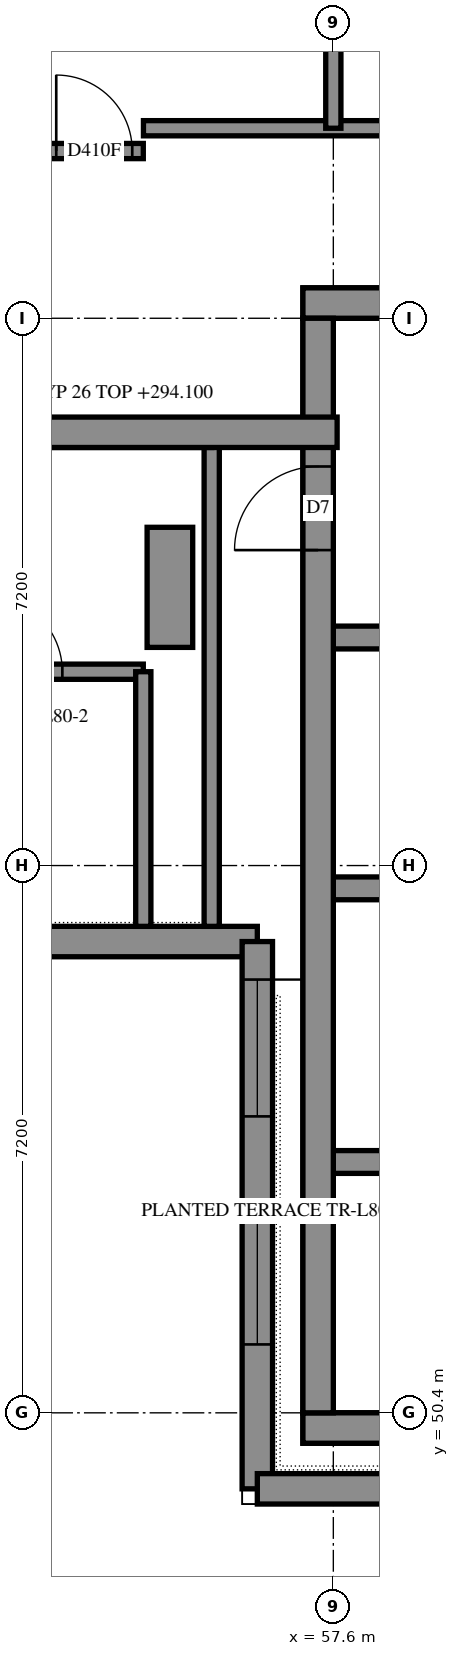
"""IFC4 building model, lengths in metres.
Left out: names, types, materials, properties, quantities, classifications, styles, units other than length and angle.
Written with IfcOpenShell. Run it as: python <this file> out.ifc"""

import sys

from ifc_helpers import new_model, si_unit, direction, frame, frame_2d, origin, place, context, subcontext, project, spatial, polyline, rectangle, outline, extrude, element, fill, save


model = new_model("IFC4")
c1 = context("Model", 3, precision=1e-05, world=origin(), true_north=direction((0.0, 1.0)))
c2 = subcontext(c1, "Body", "Model", "MODEL_VIEW")
j1 = project(units=[si_unit("LENGTHUNIT", "METRE"), si_unit("PLANEANGLEUNIT", "RADIAN")], contexts=[c1])
p1 = place(None, origin())
s1 = spatial("IfcSite", under=j1, at=p1, CompositionType="ELEMENT")
p2 = place(p1, origin())
s2 = spatial("IfcBuilding", under=s1, at=p2, CompositionType="ELEMENT")
p3 = place(p2, frame((0.0, 0.0, 294.4)))
s3 = spatial("IfcBuildingStorey", under=s2, at=p3, CompositionType="ELEMENT", Elevation=294.4)
p4 = place(p3, frame((57.2, 50.2, -0.3), z_axis=(0.0, 0.0, 1.0), x_axis=(1.0, 0.0, 0.0)))
e1 = element("IfcWall", 1, at=p4, inside=s3, PredefinedType="SHEAR", context=c2, shape_type="SweptSolid", body=[
    extrude(outline(polyline([(0.0, 0.0), (15.2, 0.0), (15.2, 3.1), (0.0, 3.1), (0.0, 0.0)])), frame((0.0, 0.2, 0.0), z_axis=(0.0, -1.0, 0.0), x_axis=(1.0, 0.0, 0.0)), (0.0, 0.0, 1.0), 0.4),
])
p5 = place(p3, frame((57.2, 65.0, -0.3), z_axis=(0.0, 0.0, 1.0), x_axis=(1.0, 0.0, 0.0)))
e2 = element("IfcWall", 2, at=p5, inside=s3, PredefinedType="SHEAR", context=c2, shape_type="SweptSolid", body=[
    extrude(outline(polyline([(0.0, 0.0), (15.2, 0.0), (15.2, 3.1), (0.0, 3.1), (0.0, 0.0)])), frame((0.0, 0.2, 0.0), z_axis=(0.0, -1.0, 0.0), x_axis=(1.0, 0.0, 0.0)), (0.0, 0.0, 1.0), 0.4),
])
p6 = place(p5, frame((10.4, 0.0, 0.3)))
e3 = element("IfcOpeningElement", 3, at=p6, cuts=e2, PredefinedType="OPENING", context=c2, shape_type="SweptSolid", body=[
    extrude(rectangle(XDim=0.8, YDim=2.1, at=frame_2d((0.4, 1.05))), frame((0.0, 0.21, 0.0), z_axis=(0.0, -1.0, 0.0), x_axis=(1.0, 0.0, 0.0)), (0.0, 0.0, 1.0), 0.42),
])
p7 = place(p3, frame((57.4, 50.4, -0.3), z_axis=(0.0, 0.0, 1.0), x_axis=(0.0, 1.0, 0.0)))
e4 = element("IfcWall", 4, at=p7, inside=s3, PredefinedType="SHEAR", context=c2, shape_type="SweptSolid", body=[
    extrude(outline(polyline([(0.0, 0.0), (14.4, 0.0), (14.4, 3.1), (0.0, 3.1), (0.0, 0.0)])), frame((0.0, 0.2, 0.0), z_axis=(0.0, -1.0, 0.0), x_axis=(1.0, 0.0, 0.0)), (0.0, 0.0, 1.0), 0.4),
])
p8 = place(p7, frame((11.35, 0.0, 0.3)))
e5 = element("IfcOpeningElement", 5, at=p8, cuts=e4, PredefinedType="OPENING", context=c2, shape_type="SweptSolid", body=[
    extrude(rectangle(XDim=1.1, YDim=2.1, at=frame_2d((0.55, 1.05))), frame((0.0, 0.21, 0.0), z_axis=(0.0, -1.0, 0.0), x_axis=(1.0, 0.0, 0.0)), (0.0, 0.0, 1.0), 0.42),
])
p9 = place(p3, frame((57.6, 53.7, 0.0), z_axis=(0.0, 0.0, 1.0), x_axis=(1.0, 0.0, 0.0)))
e6 = element("IfcWall", 6, at=p9, inside=s3, PredefinedType="SOLIDWALL", context=c2, shape_type="SweptSolid", body=[
    extrude(outline(polyline([(0.0, 0.0), (14.4, 0.0), (14.4, 3.5), (0.0, 3.5), (0.0, 0.0)])), frame((0.0, 0.15, 0.0), z_axis=(0.0, -1.0, 0.0), x_axis=(1.0, 0.0, 0.0)), (0.0, 0.0, 1.0), 0.3),
])
p10 = place(p9, frame((12.05, 0.0, 0.0)))
e7 = element("IfcOpeningElement", 7, at=p10, cuts=e6, PredefinedType="OPENING", context=c2, shape_type="SweptSolid", body=[
    extrude(rectangle(XDim=1.1, YDim=2.1, at=frame_2d((0.55, 1.05))), frame((0.0, 0.16, 0.0), z_axis=(0.0, -1.0, 0.0), x_axis=(1.0, 0.0, 0.0)), (0.0, 0.0, 1.0), 0.32),
])
p11 = place(p3, frame((57.6, 57.3, 0.0), z_axis=(0.0, 0.0, 1.0), x_axis=(1.0, 0.0, 0.0)))
e8 = element("IfcWall", 8, at=p11, inside=s3, PredefinedType="SOLIDWALL", context=c2, shape_type="SweptSolid", body=[
    extrude(outline(polyline([(0.0, 0.0), (14.4, 0.0), (14.4, 3.5), (0.0, 3.5), (0.0, 0.0)])), frame((0.0, 0.15, 0.0), z_axis=(0.0, -1.0, 0.0), x_axis=(1.0, 0.0, 0.0)), (0.0, 0.0, 1.0), 0.3),
])
p12 = place(p11, frame((12.05, 0.0, 0.0)))
e9 = element("IfcOpeningElement", 9, at=p12, cuts=e8, PredefinedType="OPENING", context=c2, shape_type="SweptSolid", body=[
    extrude(rectangle(XDim=1.1, YDim=2.1, at=frame_2d((0.55, 1.05))), frame((0.0, 0.16, 0.0), z_axis=(0.0, -1.0, 0.0), x_axis=(1.0, 0.0, 0.0)), (0.0, 0.0, 1.0), 0.32),
])
p13 = place(p3, frame((57.6, 60.6, 0.0), z_axis=(0.0, 0.0, 1.0), x_axis=(1.0, 0.0, 0.0)))
e10 = element("IfcWall", 10, at=p13, inside=s3, PredefinedType="SOLIDWALL", context=c2, shape_type="SweptSolid", body=[
    extrude(outline(polyline([(0.0, 0.0), (7.2, 0.0), (7.2, 3.5), (0.0, 3.5), (0.0, 0.0)])), frame((0.0, 0.15, 0.0), z_axis=(0.0, -1.0, 0.0), x_axis=(1.0, 0.0, 0.0)), (0.0, 0.0, 1.0), 0.3),
])
p14 = place(p3, frame((49.4, 56.6, 0.0), z_axis=(0.0, 0.0, 1.0), x_axis=(1.0, 0.0, 0.0)))
e11 = element("IfcWall", 11, at=p14, inside=s3, PredefinedType="SOLIDWALL", context=c2, shape_type="SweptSolid", body=[
    extrude(outline(polyline([(-0.2, -0.2), (7.0, -0.2), (7.0, 0.2), (0.2, 0.2), (-0.2, -0.2)])), origin(), (0.0, 0.0, 1.0), 3.5),
])
p15 = place(p14, frame((1.9, 0.0, 0.7)))
e12 = element("IfcOpeningElement", 12, at=p15, cuts=e11, PredefinedType="OPENING", context=c2, shape_type="SweptSolid", body=[
    extrude(rectangle(XDim=1.8, YDim=2.2, at=frame_2d((0.9, 1.1))), frame((0.0, 0.21, 0.0), z_axis=(0.0, -1.0, 0.0), x_axis=(1.0, 0.0, 0.0)), (0.0, 0.0, 1.0), 0.42),
])
p16 = place(p3, frame((56.6, 56.6, 0.0), z_axis=(0.0, 0.0, 1.0), x_axis=(0.0, -1.0, 0.0)))
e13 = element("IfcWall", 13, at=p16, inside=s3, PredefinedType="SOLIDWALL", context=c2, shape_type="SweptSolid", body=[
    extrude(outline(polyline([(-0.2, -0.2), (7.4, -0.2), (7.0, 0.2), (-0.2, 0.2), (-0.2, -0.2)])), origin(), (0.0, 0.0, 1.0), 3.5),
])
p17 = place(p16, frame((0.5, 0.0, 0.7)))
e14 = element("IfcOpeningElement", 14, at=p17, cuts=e13, PredefinedType="OPENING", context=c2, shape_type="SweptSolid", body=[
    extrude(rectangle(XDim=1.8, YDim=2.2, at=frame_2d((0.9, 1.1))), frame((0.0, 0.21, 0.0), z_axis=(0.0, -1.0, 0.0), x_axis=(1.0, 0.0, 0.0)), (0.0, 0.0, 1.0), 0.42),
])
p18 = place(p16, frame((3.5, 0.0, 0.7)))
e15 = element("IfcOpeningElement", 15, at=p18, cuts=e13, PredefinedType="OPENING", context=c2, shape_type="SweptSolid", body=[
    extrude(rectangle(XDim=1.8, YDim=2.2, at=frame_2d((0.9, 1.1))), frame((0.0, 0.21, 0.0), z_axis=(0.0, -1.0, 0.0), x_axis=(1.0, 0.0, 0.0)), (0.0, 0.0, 1.0), 0.42),
])
p19 = place(p3, frame((56.6, 49.4, 0.0), z_axis=(0.0, 0.0, 1.0), x_axis=(1.0, 0.0, 0.0)))
e16 = element("IfcWall", 16, at=p19, inside=s3, PredefinedType="SOLIDWALL", context=c2, shape_type="SweptSolid", body=[
    extrude(outline(polyline([(-0.2, -0.2), (13.156, -0.2), (13.322, 0.2), (0.2, 0.2), (-0.2, -0.2)])), origin(), (0.0, 0.0, 1.0), 3.5),
])
p20 = place(p19, frame((1.9, 0.0, 0.7)))
e17 = element("IfcOpeningElement", 17, at=p20, cuts=e16, PredefinedType="OPENING", context=c2, shape_type="SweptSolid", body=[
    extrude(rectangle(XDim=1.8, YDim=2.2, at=frame_2d((0.9, 1.1))), frame((0.0, 0.21, 0.0), z_axis=(0.0, -1.0, 0.0), x_axis=(1.0, 0.0, 0.0)), (0.0, 0.0, 1.0), 0.42),
])
p21 = place(p19, frame((5.5, 0.0, 0.7)))
e18 = element("IfcOpeningElement", 18, at=p21, cuts=e16, PredefinedType="OPENING", context=c2, shape_type="SweptSolid", body=[
    extrude(rectangle(XDim=1.8, YDim=2.2, at=frame_2d((0.9, 1.1))), frame((0.0, 0.21, 0.0), z_axis=(0.0, -1.0, 0.0), x_axis=(1.0, 0.0, 0.0)), (0.0, 0.0, 1.0), 0.42),
])
p22 = place(p19, frame((9.1, 0.0, 0.7)))
e19 = element("IfcOpeningElement", 19, at=p22, cuts=e16, PredefinedType="OPENING", context=c2, shape_type="SweptSolid", body=[
    extrude(rectangle(XDim=1.8, YDim=2.2, at=frame_2d((0.9, 1.1))), frame((0.0, 0.21, 0.0), z_axis=(0.0, -1.0, 0.0), x_axis=(1.0, 0.0, 0.0)), (0.0, 0.0, 1.0), 0.42),
])
p23 = place(p3, frame((56.0, 56.8, 0.0), z_axis=(0.0, 0.0, 1.0), x_axis=(0.0, 1.0, 0.0)))
e20 = element("IfcWall", 20, at=p23, inside=s3, PredefinedType="PARAPET", context=c2, shape_type="SweptSolid", body=[
    extrude(outline(polyline([(0.0, -0.1), (6.5, -0.1), (6.3, 0.1), (0.0, 0.1), (0.0, -0.1)])), origin(), (0.0, 0.0, 1.0), 0.25),
])
p24 = place(p3, frame((56.0, 63.2, 0.0), z_axis=(0.0, 0.0, 1.0), x_axis=(-1.0, 0.0, 0.0)))
e21 = element("IfcWall", 21, at=p24, inside=s3, PredefinedType="PARAPET", context=c2, shape_type="SweptSolid", body=[
    extrude(outline(polyline([(-0.1, -0.1), (6.4, -0.1), (6.4, 0.1), (0.1, 0.1), (-0.1, -0.1)])), origin(), (0.0, 0.0, 1.0), 0.25),
])
p25 = place(p3, frame((55.45, 60.47, 0.0), z_axis=(0.0, 0.0, 1.0), x_axis=(0.0, 1.0, 0.0)))
e22 = element("IfcWall", 22, at=p25, inside=s3, PredefinedType="SOLIDWALL", context=c2, shape_type="SweptSolid", body=[
    extrude(rectangle(XDim=1.58, YDim=0.6, at=frame_2d((0.79, 0.0))), origin(), (0.0, 0.0, 1.0), 0.65),
])
p26 = place(p3, frame((55.102, 67.3, 0.0), z_axis=(0.0, 0.0, 1.0), x_axis=(1.0, 0.0, 0.0)))
e23 = element("IfcWall", 23, at=p26, inside=s3, PredefinedType="PARTITIONING", context=c2, shape_type="SweptSolid", body=[
    extrude(rectangle(XDim=19.398, YDim=0.2, at=frame_2d((9.699, 0.0))), origin(), (0.0, 0.0, 1.0), 3.5),
])
p27 = place(p26, frame((6.361, 0.0, 0.0)))
e24 = element("IfcOpeningElement", 24, at=p27, cuts=e23, PredefinedType="OPENING", context=c2, shape_type="SweptSolid", body=[
    extrude(rectangle(XDim=1.0, YDim=2.1, at=frame_2d((0.5, 1.05))), frame((0.0, 0.11, 0.0), z_axis=(0.0, -1.0, 0.0), x_axis=(1.0, 0.0, 0.0)), (0.0, 0.0, 1.0), 0.22),
])
p28 = place(p26, frame((13.56, 0.0, 0.0)))
e25 = element("IfcOpeningElement", 25, at=p28, cuts=e23, PredefinedType="OPENING", context=c2, shape_type="SweptSolid", body=[
    extrude(rectangle(XDim=1.0, YDim=2.1, at=frame_2d((0.5, 1.05))), frame((0.0, 0.11, 0.0), z_axis=(0.0, -1.0, 0.0), x_axis=(1.0, 0.0, 0.0)), (0.0, 0.0, 1.0), 0.22),
])
p29 = place(p3, frame((43.2, 67.0, 0.0), z_axis=(0.0, 0.0, 1.0), x_axis=(1.0, 0.0, 0.0)))
e26 = element("IfcWall", 26, at=p29, inside=s3, PredefinedType="PARTITIONING", context=c2, shape_type="SweptSolid", body=[
    extrude(rectangle(XDim=11.9, YDim=0.2, at=frame_2d((5.95, 0.0))), origin(), (0.0, 0.0, 1.0), 3.5),
])
p30 = place(p29, frame((3.862, 0.0, 0.0)))
e27 = element("IfcOpeningElement", 27, at=p30, cuts=e26, PredefinedType="OPENING", context=c2, shape_type="SweptSolid", body=[
    extrude(rectangle(XDim=1.0, YDim=2.1, at=frame_2d((0.5, 1.05))), frame((0.0, 0.11, 0.0), z_axis=(0.0, -1.0, 0.0), x_axis=(1.0, 0.0, 0.0)), (0.0, 0.0, 1.0), 0.22),
])
p31 = place(p29, frame((10.755, 0.0, 0.0)))
e28 = element("IfcOpeningElement", 28, at=p31, cuts=e26, PredefinedType="OPENING", context=c2, shape_type="SweptSolid", body=[
    extrude(rectangle(XDim=1.0, YDim=2.1, at=frame_2d((0.5, 1.05))), frame((0.0, 0.11, 0.0), z_axis=(0.0, -1.0, 0.0), x_axis=(1.0, 0.0, 0.0)), (0.0, 0.0, 1.0), 0.22),
])
p32 = place(p3, frame((50.4, 60.15, 0.0), z_axis=(0.0, 0.0, 1.0), x_axis=(1.0, 0.0, 0.0)))
e29 = element("IfcWall", 29, at=p32, inside=s3, PredefinedType="PARTITIONING", context=c2, shape_type="SweptSolid", body=[
    extrude(rectangle(XDim=4.7, YDim=0.2, at=frame_2d((2.35, 0.0))), origin(), (0.0, 0.0, 1.0), 3.5),
])
p33 = place(p32, frame((2.635, 0.0, 0.0)))
e30 = element("IfcOpeningElement", 30, at=p33, cuts=e29, PredefinedType="OPENING", context=c2, shape_type="SweptSolid", body=[
    extrude(rectangle(XDim=1.0, YDim=2.1, at=frame_2d((0.5, 1.05))), frame((0.0, 0.11, 0.0), z_axis=(0.0, -1.0, 0.0), x_axis=(1.0, 0.0, 0.0)), (0.0, 0.0, 1.0), 0.22),
])
p34 = place(p3, frame((57.6, 67.3, 0.0), z_axis=(0.0, 0.0, 1.0), x_axis=(0.0, 1.0, 0.0)))
e31 = element("IfcWall", 31, at=p34, inside=s3, PredefinedType="PARTITIONING", context=c2, shape_type="SweptSolid", body=[
    extrude(rectangle(XDim=5.05, YDim=0.2, at=frame_2d((2.525, 0.0))), origin(), (0.0, 0.0, 1.0), 3.5),
])
p35 = place(p3, frame((55.1, 56.8, 0.0), z_axis=(0.0, 0.0, 1.0), x_axis=(0.0, 1.0, 0.0)))
e32 = element("IfcWall", 32, at=p35, inside=s3, PredefinedType="PARTITIONING", context=c2, shape_type="SweptSolid", body=[
    extrude(rectangle(XDim=3.35, YDim=0.2, at=frame_2d((1.675, 0.0))), origin(), (0.0, 0.0, 1.0), 3.5),
])
p36 = place(p17, origin())
e33 = element("IfcWindow", 33, at=p36, inside=s3, PartitioningType="SINGLE_PANEL", PredefinedType="WINDOW", context=c2, shape_type="SweptSolid", body=[
    extrude(rectangle(XDim=1.8, YDim=2.2, at=frame_2d((0.9, 1.1))), frame((0.0, 0.08, 0.0), z_axis=(0.0, -1.0, 0.0), x_axis=(1.0, 0.0, 0.0)), (0.0, 0.0, 1.0), 0.06),
])
fill(e14, e33)
p37 = place(p18, origin())
e34 = element("IfcWindow", 34, at=p37, inside=s3, PartitioningType="SINGLE_PANEL", PredefinedType="WINDOW", context=c2, shape_type="SweptSolid", body=[
    extrude(rectangle(XDim=1.8, YDim=2.2, at=frame_2d((0.9, 1.1))), frame((0.0, 0.08, 0.0), z_axis=(0.0, -1.0, 0.0), x_axis=(1.0, 0.0, 0.0)), (0.0, 0.0, 1.0), 0.06),
])
fill(e15, e34)
p38 = place(p8, origin())
e35 = element("IfcDoor", 35, at=p38, inside=s3, OperationType="SINGLE_SWING_LEFT", PredefinedType="DOOR", context=c2, shape_type="SweptSolid", body=[
    extrude(rectangle(XDim=1.1, YDim=2.1, at=frame_2d((0.55, 1.05))), frame((0.0, 0.025, 0.0), z_axis=(0.0, -1.0, 0.0), x_axis=(1.0, 0.0, 0.0)), (0.0, 0.0, 1.0), 0.05),
])
fill(e5, e35)
p39 = place(p31, origin())
e36 = element("IfcDoor", 36, at=p39, inside=s3, OperationType="SINGLE_SWING_RIGHT", PredefinedType="DOOR", context=c2, shape_type="SweptSolid", body=[
    extrude(rectangle(XDim=1.0, YDim=2.1, at=frame_2d((0.5, 1.05))), frame((0.0, 0.025, 0.0), z_axis=(0.0, -1.0, 0.0), x_axis=(1.0, 0.0, 0.0)), (0.0, 0.0, 1.0), 0.05),
])
fill(e28, e36)
p40 = place(p33, origin())
e37 = element("IfcDoor", 37, at=p40, inside=s3, OperationType="SINGLE_SWING_LEFT", PredefinedType="DOOR", context=c2, shape_type="SweptSolid", body=[
    extrude(rectangle(XDim=1.0, YDim=2.1, at=frame_2d((0.5, 1.05))), frame((0.0, 0.025, 0.0), z_axis=(0.0, -1.0, 0.0), x_axis=(1.0, 0.0, 0.0)), (0.0, 0.0, 1.0), 0.05),
])
fill(e30, e37)
save(model, sys.argv[1])
